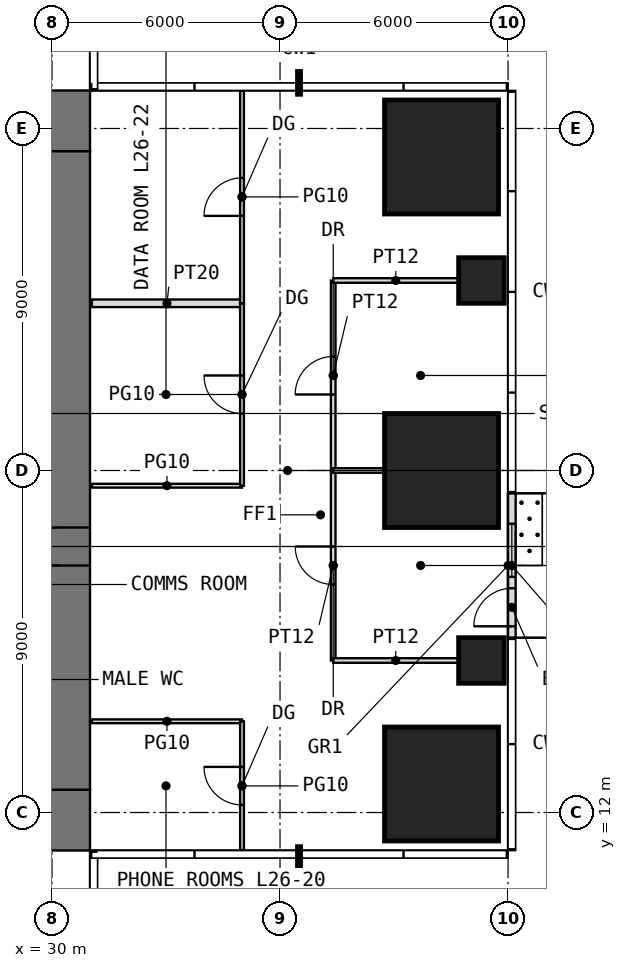
"""IFC4 building model, lengths in metres.
Left out: names, types, materials, properties, quantities, classifications, styles, units other than length and angle.
Written with IfcOpenShell. Run it as: python <this file> out.ifc"""

import sys

from ifc_helpers import new_model, si_unit, direction, frame, frame_2d, origin, origin_2d, place, context, subcontext, project, spatial, rectangle, extrude, element, fill, save


model = new_model("IFC4")
c1 = context("Model", 3, precision=1e-05, world=origin(), true_north=direction((0.0, 1.0)))
c2 = subcontext(c1, "Body", "Model", "MODEL_VIEW")
j1 = project(units=[si_unit("LENGTHUNIT", "METRE"), si_unit("PLANEANGLEUNIT", "RADIAN")], contexts=[c1])
p1 = place(None, origin())
s1 = spatial("IfcSite", under=j1, at=p1, CompositionType="ELEMENT")
p2 = place(p1, origin())
s2 = spatial("IfcBuilding", under=s1, at=p2, CompositionType="ELEMENT")
p3 = place(p2, frame((0.0, 0.0, 112.5)))
s3 = spatial("IfcBuildingStorey", under=s2, at=p3, CompositionType="ELEMENT", Elevation=112.5)
p4 = place(p3, frame((40.25, 12.75, 0.0), z_axis=(0.0, 0.0, 1.0), x_axis=(1.0, 0.0, 0.0)))
e1 = element("IfcColumn", 1, at=p4, inside=s3, PredefinedType="COLUMN", context=c2, shape_type="SweptSolid", body=[
    extrude(rectangle(XDim=3.0, YDim=3.0, at=origin_2d()), origin(), (0.0, 0.0, 1.0), 4.0),
])
p5 = place(p3, frame((41.3, 16.0, 0.0), z_axis=(0.0, 0.0, 1.0), x_axis=(1.0, 0.0, 0.0)))
e2 = element("IfcColumn", 2, at=p5, inside=s3, PredefinedType="COLUMN", context=c2, shape_type="SweptSolid", body=[
    extrude(rectangle(XDim=1.2, YDim=1.2, at=origin_2d()), origin(), (0.0, 0.0, 1.0), 4.0),
])
p6 = place(p3, frame((40.25, 21.0, 0.0), z_axis=(0.0, 0.0, 1.0), x_axis=(1.0, 0.0, 0.0)))
e3 = element("IfcColumn", 3, at=p6, inside=s3, PredefinedType="COLUMN", context=c2, shape_type="SweptSolid", body=[
    extrude(rectangle(XDim=3.0, YDim=3.0, at=origin_2d()), origin(), (0.0, 0.0, 1.0), 4.0),
])
p7 = place(p3, frame((41.3, 26.0, 0.0), z_axis=(0.0, 0.0, 1.0), x_axis=(1.0, 0.0, 0.0)))
e4 = element("IfcColumn", 4, at=p7, inside=s3, PredefinedType="COLUMN", context=c2, shape_type="SweptSolid", body=[
    extrude(rectangle(XDim=1.2, YDim=1.2, at=origin_2d()), origin(), (0.0, 0.0, 1.0), 4.0),
])
p8 = place(p3, frame((40.25, 29.25, 0.0), z_axis=(0.0, 0.0, 1.0), x_axis=(1.0, 0.0, 0.0)))
e5 = element("IfcColumn", 5, at=p8, inside=s3, PredefinedType="COLUMN", context=c2, shape_type="SweptSolid", body=[
    extrude(rectangle(XDim=3.0, YDim=3.0, at=origin_2d()), origin(), (0.0, 0.0, 1.0), 4.0),
])
p9 = place(p3, frame((42.1, 16.6, 0.0), z_axis=(0.0, 0.0, 1.0), x_axis=(0.0, 1.0, 0.0)))
e6 = element("IfcWall", 6, at=p9, inside=s3, PredefinedType="USERDEFINED", context=c2, shape_type="SweptSolid", body=[
    extrude(rectangle(XDim=3.8, YDim=0.2, at=frame_2d((1.9, 0.0))), origin(), (0.0, 0.0, 1.0), 3.75),
])
p10 = place(p9, frame((0.3, 0.0, 0.0)))
e7 = element("IfcOpeningElement", 7, at=p10, cuts=e6, PredefinedType="OPENING", context=c2, shape_type="SweptSolid", body=[
    extrude(rectangle(XDim=1.0, YDim=2.4, at=frame_2d((0.5, 1.2))), frame((0.0, 0.11, 0.0), z_axis=(0.0, -1.0, 0.0), x_axis=(1.0, 0.0, 0.0)), (0.0, 0.0, 1.0), 0.22),
])
p11 = place(p9, frame((1.6, 0.0, 0.3)))
e8 = element("IfcOpeningElement", 8, at=p11, cuts=e6, PredefinedType="OPENING", context=c2, shape_type="SweptSolid", body=[
    extrude(rectangle(XDim=1.4, YDim=2.7, at=frame_2d((0.7, 1.35))), frame((0.0, 0.11, 0.0), z_axis=(0.0, -1.0, 0.0), x_axis=(1.0, 0.0, 0.0)), (0.0, 0.0, 1.0), 0.22),
])
p12 = place(p3, frame((11.0, 11.8, -0.05), z_axis=(0.0, 0.0, 1.0), x_axis=(1.0, 0.0, 0.0)))
e9 = element("IfcWall", 9, at=p12, inside=s3, PredefinedType="SHEAR", context=c2, shape_type="SweptSolid", body=[
    extrude(rectangle(XDim=20.0, YDim=1.6, at=frame_2d((10.0, 0.0))), origin(), (0.0, 0.0, 1.0), 4.0),
])
p13 = place(p12, frame((9.0, 0.0, 0.05)))
e10 = element("IfcOpeningElement", 10, at=p13, cuts=e9, PredefinedType="OPENING", context=c2, shape_type="SweptSolid", body=[
    extrude(rectangle(XDim=2.0, YDim=2.2, at=frame_2d((1.0, 1.1))), frame((0.0, 0.81, 0.0), z_axis=(0.0, -1.0, 0.0), x_axis=(1.0, 0.0, 0.0)), (0.0, 0.0, 1.0), 1.62),
])
p14 = place(p3, frame((11.0, 30.2, -0.05), z_axis=(0.0, 0.0, 1.0), x_axis=(1.0, 0.0, 0.0)))
e11 = element("IfcWall", 11, at=p14, inside=s3, PredefinedType="SHEAR", context=c2, shape_type="SweptSolid", body=[
    extrude(rectangle(XDim=20.0, YDim=1.6, at=frame_2d((10.0, 0.0))), origin(), (0.0, 0.0, 1.0), 4.0),
])
p15 = place(p14, frame((9.0, 0.0, 0.05)))
e12 = element("IfcOpeningElement", 12, at=p15, cuts=e11, PredefinedType="OPENING", context=c2, shape_type="SweptSolid", body=[
    extrude(rectangle(XDim=2.0, YDim=2.2, at=frame_2d((1.0, 1.1))), frame((0.0, 0.81, 0.0), z_axis=(0.0, -1.0, 0.0), x_axis=(1.0, 0.0, 0.0)), (0.0, 0.0, 1.0), 1.62),
])
p16 = place(p3, frame((30.2, 12.6, -0.05), z_axis=(0.0, 0.0, 1.0), x_axis=(0.0, 1.0, 0.0)))
e13 = element("IfcWall", 13, at=p16, inside=s3, PredefinedType="SHEAR", context=c2, shape_type="SweptSolid", body=[
    extrude(rectangle(XDim=16.8, YDim=1.6, at=frame_2d((8.4, 0.0))), origin(), (0.0, 0.0, 1.0), 4.0),
])
p17 = place(p16, frame((5.9, 0.0, 0.05)))
e14 = element("IfcOpeningElement", 14, at=p17, cuts=e13, PredefinedType="OPENING", context=c2, shape_type="SweptSolid", body=[
    extrude(rectangle(XDim=1.0, YDim=2.2, at=frame_2d((0.5, 1.1))), frame((0.0, 0.81, 0.0), z_axis=(0.0, -1.0, 0.0), x_axis=(1.0, 0.0, 0.0)), (0.0, 0.0, 1.0), 1.62),
])
for number, where, z_axis, x_axis in (
    (15, (31.05, 14.4, 0.0), (0.0, 0.0, 1.0), (1.0, 0.0, 0.0)),
    (16, (31.05, 20.6, 0.0), (0.0, 0.0, 1.0), (1.0, 0.0, 0.0)),
):
    element("IfcWall", number, at=place(p3, frame(where, z_axis=z_axis, x_axis=x_axis)), inside=s3, PredefinedType="PARTITIONING", context=c2, shape_type="SweptSolid", body=[
        extrude(rectangle(XDim=3.95, YDim=0.1, at=frame_2d((1.975, 0.0))), origin(), (0.0, 0.0, 1.0), 3.75),
    ])
p18 = place(p3, frame((31.05, 25.4, 0.0), z_axis=(0.0, 0.0, 1.0), x_axis=(1.0, 0.0, 0.0)))
e17 = element("IfcWall", 17, at=p18, inside=s3, PredefinedType="PARTITIONING", context=c2, shape_type="SweptSolid", body=[
    extrude(rectangle(XDim=3.95, YDim=0.2, at=frame_2d((1.975, 0.0))), origin(), (0.0, 0.0, 1.0), 3.75),
])
p19 = place(p3, frame((35.0, 11.0, 0.0), z_axis=(0.0, 0.0, 1.0), x_axis=(0.0, 1.0, 0.0)))
e18 = element("IfcWall", 18, at=p19, inside=s3, PredefinedType="PARTITIONING", context=c2, shape_type="SweptSolid", body=[
    extrude(rectangle(XDim=3.4, YDim=0.1, at=frame_2d((1.7, 0.0))), origin(), (0.0, 0.0, 1.0), 3.75),
])
p20 = place(p19, frame((1.2, 0.0, 0.0)))
e19 = element("IfcOpeningElement", 19, at=p20, cuts=e18, PredefinedType="OPENING", context=c2, shape_type="SweptSolid", body=[
    extrude(rectangle(XDim=1.0, YDim=2.4, at=frame_2d((0.5, 1.2))), frame((0.0, 0.06, 0.0), z_axis=(0.0, -1.0, 0.0), x_axis=(1.0, 0.0, 0.0)), (0.0, 0.0, 1.0), 0.12),
])
p21 = place(p3, frame((35.0, 20.6, 0.0), z_axis=(0.0, 0.0, 1.0), x_axis=(0.0, 1.0, 0.0)))
e20 = element("IfcWall", 20, at=p21, inside=s3, PredefinedType="PARTITIONING", context=c2, shape_type="SweptSolid", body=[
    extrude(rectangle(XDim=4.8, YDim=0.1, at=frame_2d((2.4, 0.0))), origin(), (0.0, 0.0, 1.0), 3.75),
])
p22 = place(p21, frame((1.9, 0.0, 0.0)))
e21 = element("IfcOpeningElement", 21, at=p22, cuts=e20, PredefinedType="OPENING", context=c2, shape_type="SweptSolid", body=[
    extrude(rectangle(XDim=1.0, YDim=2.4, at=frame_2d((0.5, 1.2))), frame((0.0, 0.06, 0.0), z_axis=(0.0, -1.0, 0.0), x_axis=(1.0, 0.0, 0.0)), (0.0, 0.0, 1.0), 0.12),
])
p23 = place(p3, frame((35.0, 25.4, 0.0), z_axis=(0.0, 0.0, 1.0), x_axis=(0.0, 1.0, 0.0)))
e22 = element("IfcWall", 22, at=p23, inside=s3, PredefinedType="PARTITIONING", context=c2, shape_type="SweptSolid", body=[
    extrude(rectangle(XDim=5.6, YDim=0.1, at=frame_2d((2.8, 0.0))), origin(), (0.0, 0.0, 1.0), 3.75),
])
p24 = place(p23, frame((2.3, 0.0, 0.0)))
e23 = element("IfcOpeningElement", 23, at=p24, cuts=e22, PredefinedType="OPENING", context=c2, shape_type="SweptSolid", body=[
    extrude(rectangle(XDim=1.0, YDim=2.4, at=frame_2d((0.5, 1.2))), frame((0.0, 0.06, 0.0), z_axis=(0.0, -1.0, 0.0), x_axis=(1.0, 0.0, 0.0)), (0.0, 0.0, 1.0), 0.12),
])
p25 = place(p3, frame((37.4, 16.0, 0.0), z_axis=(0.0, 0.0, 1.0), x_axis=(0.0, 1.0, 0.0)))
e24 = element("IfcWall", 24, at=p25, inside=s3, PredefinedType="PARTITIONING", context=c2, shape_type="SweptSolid", body=[
    extrude(rectangle(XDim=5.0, YDim=0.12, at=frame_2d((2.5, 0.0))), origin(), (0.0, 0.0, 1.0), 3.75),
])
p26 = place(p25, frame((2.0, 0.0, 0.0)))
e25 = element("IfcOpeningElement", 25, at=p26, cuts=e24, PredefinedType="OPENING", context=c2, shape_type="SweptSolid", body=[
    extrude(rectangle(XDim=1.0, YDim=2.2, at=frame_2d((0.5, 1.1))), frame((0.0, 0.07, 0.0), z_axis=(0.0, -1.0, 0.0), x_axis=(1.0, 0.0, 0.0)), (0.0, 0.0, 1.0), 0.14),
])
p27 = place(p3, frame((37.4, 16.0, 0.0), z_axis=(0.0, 0.0, 1.0), x_axis=(1.0, 0.0, 0.0)))
e26 = element("IfcWall", 26, at=p27, inside=s3, PredefinedType="PARTITIONING", context=c2, shape_type="SweptSolid", body=[
    extrude(rectangle(XDim=3.29, YDim=0.12, at=frame_2d((1.645, 0.0))), origin(), (0.0, 0.0, 1.0), 3.75),
])
p28 = place(p3, frame((37.4, 21.0, 0.0), z_axis=(0.0, 0.0, 1.0), x_axis=(0.0, 1.0, 0.0)))
e27 = element("IfcWall", 27, at=p28, inside=s3, PredefinedType="PARTITIONING", context=c2, shape_type="SweptSolid", body=[
    extrude(rectangle(XDim=5.0, YDim=0.12, at=frame_2d((2.5, 0.0))), origin(), (0.0, 0.0, 1.0), 3.75),
])
p29 = place(p28, frame((2.0, 0.0, 0.0)))
e28 = element("IfcOpeningElement", 28, at=p29, cuts=e27, PredefinedType="OPENING", context=c2, shape_type="SweptSolid", body=[
    extrude(rectangle(XDim=1.0, YDim=2.2, at=frame_2d((0.5, 1.1))), frame((0.0, 0.07, 0.0), z_axis=(0.0, -1.0, 0.0), x_axis=(1.0, 0.0, 0.0)), (0.0, 0.0, 1.0), 0.14),
])
p30 = place(p3, frame((37.4, 21.0, 0.0), z_axis=(0.0, 0.0, 1.0), x_axis=(1.0, 0.0, 0.0)))
e29 = element("IfcWall", 29, at=p30, inside=s3, PredefinedType="PARTITIONING", context=c2, shape_type="SweptSolid", body=[
    extrude(rectangle(XDim=1.34, YDim=0.12, at=frame_2d((0.67, 0.0))), origin(), (0.0, 0.0, 1.0), 3.75),
])
p31 = place(p3, frame((37.4, 26.0, 0.0), z_axis=(0.0, 0.0, 1.0), x_axis=(1.0, 0.0, 0.0)))
e30 = element("IfcWall", 30, at=p31, inside=s3, PredefinedType="PARTITIONING", context=c2, shape_type="SweptSolid", body=[
    extrude(rectangle(XDim=3.29, YDim=0.12, at=frame_2d((1.645, 0.0))), origin(), (0.0, 0.0, 1.0), 3.75),
])
p32 = place(p10, origin())
e31 = element("IfcDoor", 31, at=p32, inside=s3, OperationType="SINGLE_SWING_LEFT", PredefinedType="DOOR", context=c2, shape_type="SweptSolid", body=[
    extrude(rectangle(XDim=1.0, YDim=2.4, at=frame_2d((0.5, 1.2))), frame((0.0, 0.025, 0.0), z_axis=(0.0, -1.0, 0.0), x_axis=(1.0, 0.0, 0.0)), (0.0, 0.0, 1.0), 0.05),
])
fill(e7, e31)
p33 = place(p11, origin())
e32 = element("IfcWindow", 32, at=p33, inside=s3, PartitioningType="SINGLE_PANEL", PredefinedType="WINDOW", context=c2, shape_type="SweptSolid", body=[
    extrude(rectangle(XDim=1.4, YDim=2.7, at=frame_2d((0.7, 1.35))), frame((0.0, 0.03, 0.0), z_axis=(0.0, -1.0, 0.0), x_axis=(1.0, 0.0, 0.0)), (0.0, 0.0, 1.0), 0.06),
])
fill(e8, e32)
p34 = place(p17, origin())
e33 = element("IfcDoor", 33, at=p34, inside=s3, OperationType="SINGLE_SWING_LEFT", PredefinedType="DOOR", context=c2, shape_type="SweptSolid", body=[
    extrude(rectangle(XDim=1.0, YDim=2.2, at=frame_2d((0.5, 1.1))), frame((0.0, 0.025, 0.0), z_axis=(0.0, -1.0, 0.0), x_axis=(1.0, 0.0, 0.0)), (0.0, 0.0, 1.0), 0.05),
])
fill(e14, e33)
p35 = place(p20, origin())
e34 = element("IfcDoor", 34, at=p35, inside=s3, OperationType="SINGLE_SWING_RIGHT", PredefinedType="DOOR", context=c2, shape_type="SweptSolid", body=[
    extrude(rectangle(XDim=1.0, YDim=2.4, at=frame_2d((0.5, 1.2))), frame((0.0, 0.025, 0.0), z_axis=(0.0, -1.0, 0.0), x_axis=(1.0, 0.0, 0.0)), (0.0, 0.0, 1.0), 0.05),
])
fill(e19, e34)
p36 = place(p22, origin())
e35 = element("IfcDoor", 35, at=p36, inside=s3, OperationType="SINGLE_SWING_RIGHT", PredefinedType="DOOR", context=c2, shape_type="SweptSolid", body=[
    extrude(rectangle(XDim=1.0, YDim=2.4, at=frame_2d((0.5, 1.2))), frame((0.0, 0.025, 0.0), z_axis=(0.0, -1.0, 0.0), x_axis=(1.0, 0.0, 0.0)), (0.0, 0.0, 1.0), 0.05),
])
fill(e21, e35)
p37 = place(p24, origin())
e36 = element("IfcDoor", 36, at=p37, inside=s3, OperationType="SINGLE_SWING_LEFT", PredefinedType="DOOR", context=c2, shape_type="SweptSolid", body=[
    extrude(rectangle(XDim=1.0, YDim=2.4, at=frame_2d((0.5, 1.2))), frame((0.0, 0.025, 0.0), z_axis=(0.0, -1.0, 0.0), x_axis=(1.0, 0.0, 0.0)), (0.0, 0.0, 1.0), 0.05),
])
fill(e23, e36)
p38 = place(p26, origin())
e37 = element("IfcDoor", 37, at=p38, inside=s3, OperationType="SINGLE_SWING_RIGHT", PredefinedType="DOOR", context=c2, shape_type="SweptSolid", body=[
    extrude(rectangle(XDim=1.0, YDim=2.2, at=frame_2d((0.5, 1.1))), frame((0.0, 0.025, 0.0), z_axis=(0.0, -1.0, 0.0), x_axis=(1.0, 0.0, 0.0)), (0.0, 0.0, 1.0), 0.05),
])
fill(e25, e37)
p39 = place(p29, origin())
e38 = element("IfcDoor", 38, at=p39, inside=s3, OperationType="SINGLE_SWING_LEFT", PredefinedType="DOOR", context=c2, shape_type="SweptSolid", body=[
    extrude(rectangle(XDim=1.0, YDim=2.2, at=frame_2d((0.5, 1.1))), frame((0.0, 0.025, 0.0), z_axis=(0.0, -1.0, 0.0), x_axis=(1.0, 0.0, 0.0)), (0.0, 0.0, 1.0), 0.05),
])
fill(e28, e38)
save(model, sys.argv[1])
